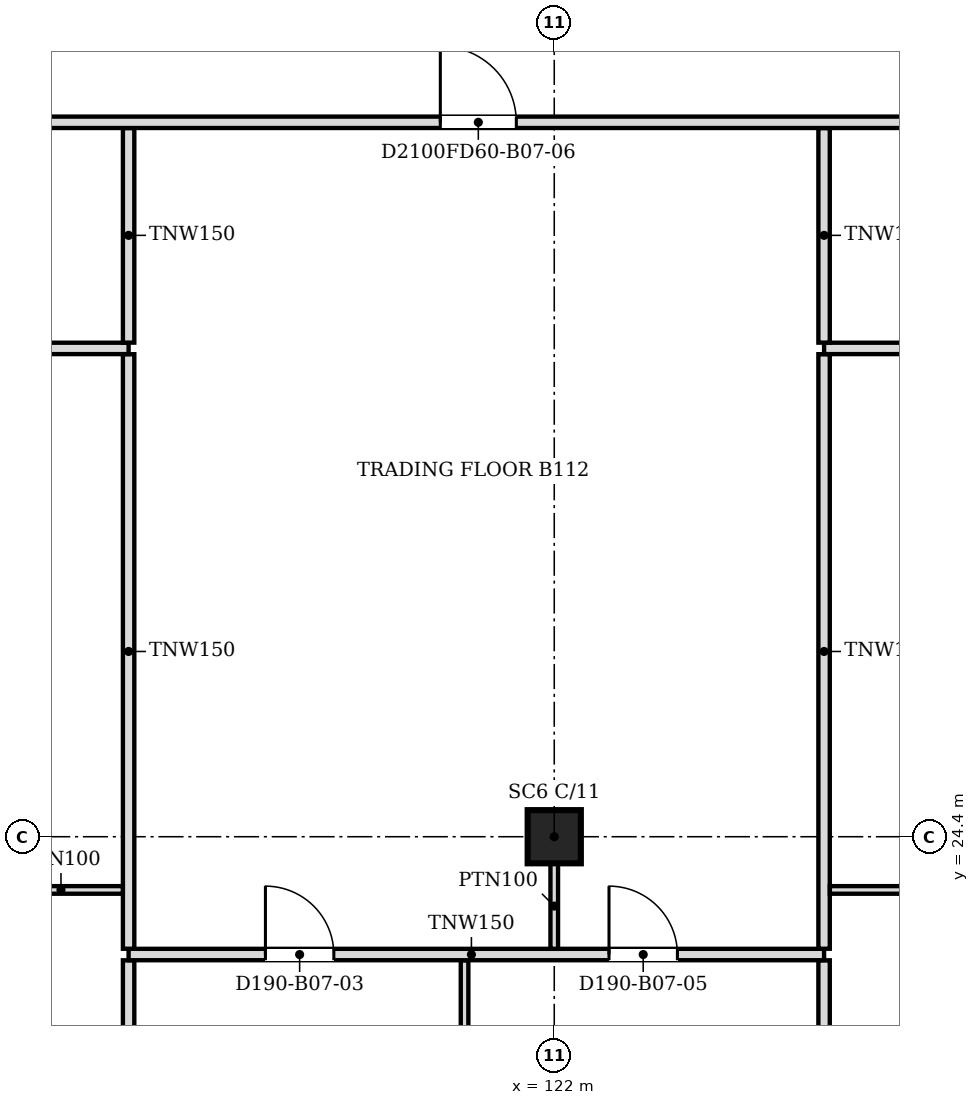
"""IFC4 building model, lengths in metres.
Left out: names, types, materials, properties, quantities, classifications, styles, units other than length and angle.
Written with IfcOpenShell. Run it as: python <this file> out.ifc"""

import sys

from ifc_helpers import new_model, si_unit, direction, frame, frame_2d, origin, origin_2d, place, context, subcontext, project, spatial, rectangle, extrude, source, transform, mapped, element, fill, save


model = new_model("IFC4")
c1 = context("Model", 3, precision=1e-05, world=origin(), true_north=direction((0.0, 1.0)))
c2 = subcontext(c1, "Body", "Model", "MODEL_VIEW")
j1 = project(units=[si_unit("LENGTHUNIT", "METRE"), si_unit("PLANEANGLEUNIT", "RADIAN")], contexts=[c1])
p1 = place(None, origin())
s1 = spatial("IfcSite", under=j1, at=p1, CompositionType="ELEMENT")
p2 = place(p1, origin())
s2 = spatial("IfcBuilding", under=s1, at=p2, CompositionType="ELEMENT")
p3 = place(p2, frame((0.0, 0.0, 72.4)))
s3 = spatial("IfcBuildingStorey", under=s2, at=p3, CompositionType="ELEMENT", Elevation=72.4)
p4 = place(p3, frame((122.0, 24.4, 0.0), z_axis=(0.0, 0.0, 1.0), x_axis=(1.0, 0.0, 0.0)))
e1 = element("IfcColumn", 1, at=p4, inside=s3, PredefinedType="COLUMN", context=c2, shape_type="SweptSolid", body=[
    extrude(rectangle(XDim=0.7, YDim=0.7, at=origin_2d()), origin(), (0.0, 0.0, 1.0), 3.6),
])
p5 = place(p3, frame((116.4, 18.8, 0.0), z_axis=(0.0, 0.0, 1.0), x_axis=(0.0, 1.0, 0.0)))
e2 = element("IfcWall", 2, at=p5, inside=s3, PredefinedType="PARTITIONING", context=c2, shape_type="SweptSolid", body=[
    extrude(rectangle(XDim=3.974, YDim=0.15, at=frame_2d((1.987, 0.0))), origin(), (0.0, 0.0, 1.0), 3.067),
])
p6 = place(p3, frame((120.82, 18.8, 0.0), z_axis=(0.0, 0.0, 1.0), x_axis=(0.0, 1.0, 0.0)))
e3 = element("IfcWall", 3, at=p6, inside=s3, PredefinedType="PARTITIONING", context=c2, shape_type="SweptSolid", body=[
    extrude(rectangle(XDim=3.974, YDim=0.1, at=frame_2d((1.987, 0.0))), origin(), (0.0, 0.0, 1.0), 3.067),
])
p7 = place(p3, frame((125.55, 18.8, 0.0), z_axis=(0.0, 0.0, 1.0), x_axis=(0.0, 1.0, 0.0)))
e4 = element("IfcWall", 4, at=p7, inside=s3, PredefinedType="PARTITIONING", context=c2, shape_type="SweptSolid", body=[
    extrude(rectangle(XDim=3.974, YDim=0.15, at=frame_2d((1.987, 0.0))), origin(), (0.0, 0.0, 1.0), 3.067),
])
p8 = place(p3, frame((125.55, 22.85, 0.0), z_axis=(0.0, 0.0, 1.0), x_axis=(-1.0, 0.0, 0.0)))
e5 = element("IfcWall", 5, at=p8, inside=s3, PredefinedType="PARTITIONING", context=c2, shape_type="SweptSolid", body=[
    extrude(rectangle(XDim=9.15, YDim=0.15, at=frame_2d((4.575, 0.0))), origin(), (0.0, 0.0, 1.0), 3.067),
])
m1 = source(origin(), c2, "Body", "SweptSolid", [
    extrude(rectangle(XDim=0.9, YDim=2.1, at=frame_2d((0.45, 1.05))), frame((0.0, 0.085, 0.0), z_axis=(0.0, -1.0, 0.0), x_axis=(1.0, 0.0, 0.0)), (0.0, 0.0, 1.0), 0.17),
])
p9 = place(p8, frame((6.45, 0.0, 0.0)))
e6 = element("IfcOpeningElement", 6, at=p9, cuts=e5, PredefinedType="OPENING", context=c2, shape_type="MappedRepresentation", body=[
    mapped(m1, transform((0.0, 0.0, 0.0), scale=1.0)),
])
p10 = place(p8, frame((1.93, 0.0, 0.0)))
e7 = element("IfcOpeningElement", 7, at=p10, cuts=e5, PredefinedType="OPENING", context=c2, shape_type="MappedRepresentation", body=[
    mapped(m1, transform((0.0, 0.0, 0.0), scale=1.0)),
])
for number, where, z_axis, x_axis in (
    (8, (116.4, 22.926, 0.0), (0.0, 0.0, 1.0), (0.0, 1.0, 0.0)),
    (9, (125.55, 22.926, 0.0), (0.0, 0.0, 1.0), (0.0, 1.0, 0.0)),
):
    element("IfcWall", number, at=place(p3, frame(where, z_axis=z_axis, x_axis=x_axis)), inside=s3, PredefinedType="PARTITIONING", context=c2, shape_type="SweptSolid", body=[
        extrude(rectangle(XDim=7.823, YDim=0.15, at=frame_2d((3.912, 0.0))), origin(), (0.0, 0.0, 1.0), 3.067),
    ])
p11 = place(p3, frame((116.324, 23.7, 0.0), z_axis=(0.0, 0.0, 1.0), x_axis=(-1.0, 0.0, 0.0)))
e10 = element("IfcWall", 10, at=p11, inside=s3, PredefinedType="PARTITIONING", context=c2, shape_type="SweptSolid", body=[
    extrude(rectangle(XDim=4.128, YDim=0.1, at=frame_2d((2.064, 0.0))), origin(), (0.0, 0.0, 1.0), 3.067),
])
m2 = source(origin(), c2, "Body", "SweptSolid", [
    extrude(rectangle(XDim=0.9, YDim=2.1, at=frame_2d((0.45, 1.05))), frame((0.0, 0.06, 0.0), z_axis=(0.0, -1.0, 0.0), x_axis=(1.0, 0.0, 0.0)), (0.0, 0.0, 1.0), 0.12),
])
p12 = place(p11, frame((1.628, 0.0, 0.0)))
e11 = element("IfcOpeningElement", 11, at=p12, cuts=e10, PredefinedType="OPENING", context=c2, shape_type="MappedRepresentation", body=[
    mapped(m2, transform((0.0, 0.0, 0.0), scale=1.0)),
])
p13 = place(p3, frame((133.394, 23.7, 0.0), z_axis=(0.0, 0.0, 1.0), x_axis=(-1.0, 0.0, 0.0)))
e12 = element("IfcWall", 12, at=p13, inside=s3, PredefinedType="PARTITIONING", context=c2, shape_type="SweptSolid", body=[
    extrude(rectangle(XDim=7.768, YDim=0.1, at=frame_2d((3.884, 0.0))), origin(), (0.0, 0.0, 1.0), 3.067),
])
p14 = place(p13, frame((3.468, 0.0, 0.0)))
e13 = element("IfcOpeningElement", 13, at=p14, cuts=e12, PredefinedType="OPENING", context=c2, shape_type="MappedRepresentation", body=[
    mapped(m2, transform((0.0, 0.0, 0.0), scale=1.0)),
])
p15 = place(p3, frame((122.0, 24.05, 0.0), z_axis=(0.0, 0.0, 1.0), x_axis=(0.0, -1.0, 0.0)))
e14 = element("IfcWall", 14, at=p15, inside=s3, PredefinedType="PARTITIONING", context=c2, shape_type="SweptSolid", body=[
    extrude(rectangle(XDim=1.125, YDim=0.1, at=frame_2d((0.562, 0.0))), origin(), (0.0, 0.0, 1.0), 3.067),
])
p16 = place(p3, frame((116.4, 30.825, 0.0), z_axis=(0.0, 0.0, 1.0), x_axis=(-1.0, 0.0, 0.0)))
e15 = element("IfcWall", 15, at=p16, inside=s3, PredefinedType="PARTITIONING", context=c2, shape_type="SweptSolid", body=[
    extrude(rectangle(XDim=9.15, YDim=0.15, at=frame_2d((4.575, 0.0))), origin(), (0.0, 0.0, 1.0), 3.067),
])
p17 = place(p16, frame((4.15, 0.0, 0.0)))
e16 = element("IfcOpeningElement", 16, at=p17, cuts=e15, PredefinedType="OPENING", context=c2, shape_type="MappedRepresentation", body=[
    mapped(m1, transform((0.0, 0.0, 0.0), scale=1.0)),
])
p18 = place(p3, frame((133.7, 30.825, 0.0), z_axis=(0.0, 0.0, 1.0), x_axis=(-1.0, 0.0, 0.0)))
e17 = element("IfcWall", 17, at=p18, inside=s3, PredefinedType="PARTITIONING", context=c2, shape_type="SweptSolid", body=[
    extrude(rectangle(XDim=8.15, YDim=0.15, at=frame_2d((4.075, 0.0))), origin(), (0.0, 0.0, 1.0), 3.067),
])
p19 = place(p18, frame((3.65, 0.0, 0.0)))
e18 = element("IfcOpeningElement", 18, at=p19, cuts=e17, PredefinedType="OPENING", context=c2, shape_type="MappedRepresentation", body=[
    mapped(m1, transform((0.0, 0.0, 0.0), scale=1.0)),
])
for number, where, z_axis, x_axis in (
    (19, (116.4, 30.901, 0.0), (0.0, 0.0, 1.0), (0.0, 1.0, 0.0)),
    (20, (125.55, 30.901, 0.0), (0.0, 0.0, 1.0), (0.0, 1.0, 0.0)),
):
    element("IfcWall", number, at=place(p3, frame(where, z_axis=z_axis, x_axis=x_axis)), inside=s3, PredefinedType="PARTITIONING", context=c2, shape_type="SweptSolid", body=[
        extrude(rectangle(XDim=2.823, YDim=0.15, at=frame_2d((1.412, 0.0))), origin(), (0.0, 0.0, 1.0), 3.067),
    ])
p20 = place(p3, frame((133.7, 33.8, 0.0), z_axis=(0.0, 0.0, 1.0), x_axis=(-1.0, 0.0, 0.0)))
e21 = element("IfcWall", 21, at=p20, inside=s3, PredefinedType="PARTITIONING", context=c2, shape_type="SweptSolid", body=[
    extrude(rectangle(XDim=47.8, YDim=0.15, at=frame_2d((23.9, 0.0))), origin(), (0.0, 0.0, 1.0), 3.067),
])
m3 = source(origin(), c2, "Body", "SweptSolid", [
    extrude(rectangle(XDim=1.0, YDim=2.1, at=frame_2d((0.5, 1.05))), frame((0.0, 0.085, 0.0), z_axis=(0.0, -1.0, 0.0), x_axis=(1.0, 0.0, 0.0)), (0.0, 0.0, 1.0), 0.17),
])
p21 = place(p20, frame((3.549, 0.0, 0.0)))
e22 = element("IfcOpeningElement", 22, at=p21, cuts=e21, PredefinedType="OPENING", context=c2, shape_type="MappedRepresentation", body=[
    mapped(m3, transform((0.0, 0.0, 0.0), scale=1.0)),
])
p22 = place(p20, frame((42.7, 0.0, 0.0)))
e23 = element("IfcOpeningElement", 23, at=p22, cuts=e21, PredefinedType="OPENING", context=c2, shape_type="MappedRepresentation", body=[
    mapped(m3, transform((0.0, 0.0, 0.0), scale=1.0)),
])
p23 = place(p20, frame((12.199, 0.0, 0.0)))
e24 = element("IfcOpeningElement", 24, at=p23, cuts=e21, PredefinedType="OPENING", context=c2, shape_type="MappedRepresentation", body=[
    mapped(m3, transform((0.0, 0.0, 0.0), scale=1.0)),
])
p24 = place(p20, frame((21.349, 0.0, 0.0)))
e25 = element("IfcOpeningElement", 25, at=p24, cuts=e21, PredefinedType="OPENING", context=c2, shape_type="MappedRepresentation", body=[
    mapped(m3, transform((0.0, 0.0, 0.0), scale=1.0)),
])
p25 = place(p20, frame((32.05, 0.0, 0.0)))
e26 = element("IfcOpeningElement", 26, at=p25, cuts=e21, PredefinedType="OPENING", context=c2, shape_type="MappedRepresentation", body=[
    mapped(m3, transform((0.0, 0.0, 0.0), scale=1.0)),
])
m4 = source(origin(), c2, "Body", "SweptSolid", [
    extrude(rectangle(XDim=0.9, YDim=2.1, at=frame_2d((0.45, 1.05))), frame((0.0, 0.025, 0.0), z_axis=(0.0, -1.0, 0.0), x_axis=(1.0, 0.0, 0.0)), (0.0, 0.0, 1.0), 0.05),
])
p26 = place(p9, origin())
e27 = element("IfcDoor", 27, at=p26, inside=s3, OperationType="SINGLE_SWING_RIGHT", PredefinedType="DOOR", context=c2, shape_type="MappedRepresentation", body=[
    mapped(m4, transform((0.0, 0.0, 0.0), scale=1.0)),
])
fill(e6, e27)
p27 = place(p10, origin())
e28 = element("IfcDoor", 28, at=p27, inside=s3, OperationType="SINGLE_SWING_RIGHT", PredefinedType="DOOR", context=c2, shape_type="MappedRepresentation", body=[
    mapped(m4, transform((0.0, 0.0, 0.0), scale=1.0)),
])
fill(e7, e28)
m5 = source(origin(), c2, "Body", "SweptSolid", [
    extrude(rectangle(XDim=1.0, YDim=2.1, at=frame_2d((0.5, 1.05))), frame((0.0, 0.025, 0.0), z_axis=(0.0, -1.0, 0.0), x_axis=(1.0, 0.0, 0.0)), (0.0, 0.0, 1.0), 0.05),
])
p28 = place(p23, origin())
e29 = element("IfcDoor", 29, at=p28, inside=s3, OperationType="SINGLE_SWING_RIGHT", PredefinedType="DOOR", context=c2, shape_type="MappedRepresentation", body=[
    mapped(m5, transform((0.0, 0.0, 0.0), scale=1.0)),
])
fill(e24, e29)
save(model, sys.argv[1])
